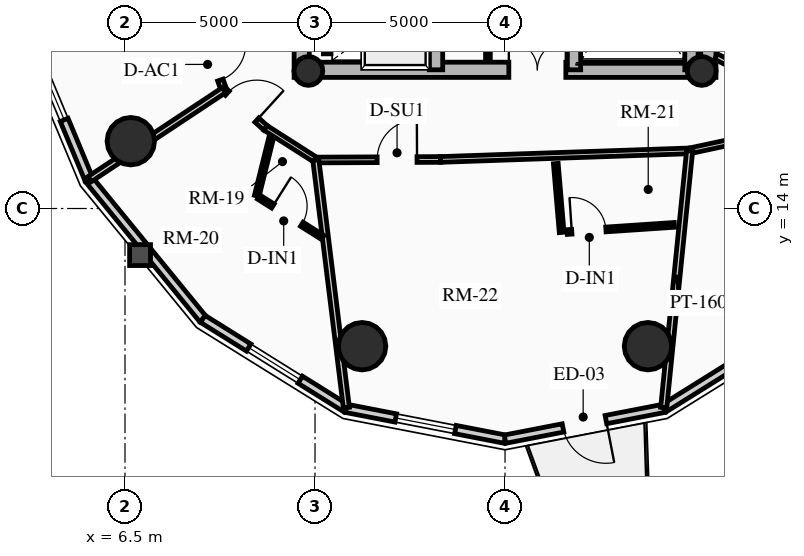
"""IFC4 building model, lengths in metres.
Left out: names, types, materials, properties, quantities, classifications, styles, units other than length and angle.
Written with IfcOpenShell. Run it as: python <this file> out.ifc"""

import sys

from ifc_helpers import new_model, si_unit, direction, frame, frame_2d, origin, origin_2d, place, context, subcontext, project, spatial, rectangle, circle, hollow_circle, extrude, source, transform, mapped, element, fill, save


model = new_model("IFC4")
c1 = context("Model", 3, precision=1e-05, world=origin(), true_north=direction((0.0, 1.0)))
c2 = subcontext(c1, "Body", "Model", "MODEL_VIEW")
j1 = project(units=[si_unit("LENGTHUNIT", "METRE"), si_unit("PLANEANGLEUNIT", "RADIAN")], contexts=[c1])
p1 = place(None, origin())
s1 = spatial("IfcSite", under=j1, at=p1, CompositionType="ELEMENT")
p2 = place(p1, origin())
s2 = spatial("IfcBuilding", under=s1, at=p2, CompositionType="ELEMENT")
p3 = place(p2, frame((0.0, 0.0, 180.7)))
s3 = spatial("IfcBuildingStorey", under=s2, at=p3, CompositionType="ELEMENT", Elevation=180.7)
for number, where, z_axis, x_axis in (
    (1, (11.15, 17.45, 0.0), (0.0, 0.0, 1.0), (0.0, 1.0, 0.0)),
    (2, (21.85, 17.45, 0.0), (0.0, 0.0, 1.0), (0.0, 1.0, 0.0)),
):
    element("IfcWall", number, at=place(p3, frame(where, z_axis=z_axis, x_axis=x_axis)), inside=s3, PredefinedType="SHEAR", context=c2, shape_type="SweptSolid", body=[
        extrude(rectangle(XDim=14.1, YDim=0.4, at=frame_2d((7.05, 0.0))), origin(), (0.0, 0.0, 1.0), 2.91),
    ])
p4 = place(p3, frame((11.15, 17.65, 0.0), z_axis=(0.0, 0.0, 1.0), x_axis=(1.0, 0.0, 0.0)))
e3 = element("IfcWall", 3, at=p4, inside=s3, PredefinedType="SHEAR", context=c2, shape_type="SweptSolid", body=[
    extrude(rectangle(XDim=10.7, YDim=0.4, at=frame_2d((5.35, 0.0))), origin(), (0.0, 0.0, 1.0), 2.91),
])
m1 = source(origin(), c2, "Body", "SweptSolid", [
    extrude(rectangle(XDim=1.5, YDim=2.02, at=frame_2d((0.75, 1.01))), frame((0.0, 0.21, 0.0), z_axis=(0.0, -1.0, 0.0), x_axis=(1.0, 0.0, 0.0)), (0.0, 0.0, 1.0), 0.42),
])
p5 = place(p4, frame((5.45, 0.0, 0.0)))
e4 = element("IfcOpeningElement", 4, at=p5, cuts=e3, PredefinedType="OPENING", context=c2, shape_type="MappedRepresentation", body=[
    mapped(m1, transform((0.0, 0.0, 0.0), x_axis=(1.0, 0.0, 0.0), y_axis=(0.0, 1.0, 0.0), z_axis=(0.0, 0.0, 1.0), scale=1.0)),
])
p6 = place(p3, frame((14.685, 17.65, 0.0), z_axis=(0.0, 0.0, 1.0), x_axis=(0.0, 1.0, 0.0)))
e5 = element("IfcWall", 5, at=p6, inside=s3, PredefinedType="SHEAR", context=c2, shape_type="SweptSolid", body=[
    extrude(rectangle(XDim=13.7, YDim=0.35, at=frame_2d((6.85, 0.0))), origin(), (0.0, 0.0, 1.0), 2.91),
])
m2 = source(origin(), c2, "Body", "SweptSolid", [
    extrude(rectangle(XDim=1.1, YDim=2.015, at=frame_2d((0.55, 1.007))), frame((0.0, 0.185, 0.0), z_axis=(0.0, -1.0, 0.0), x_axis=(1.0, 0.0, 0.0)), (0.0, 0.0, 1.0), 0.37),
])
p7 = place(p6, frame((4.85, 0.0, 0.0)))
e6 = element("IfcOpeningElement", 6, at=p7, cuts=e5, PredefinedType="OPENING", context=c2, shape_type="MappedRepresentation", body=[
    mapped(m2, transform((0.0, 0.0, 0.0), x_axis=(1.0, 0.0, 0.0), y_axis=(0.0, 1.0, 0.0), z_axis=(0.0, 0.0, 1.0), scale=1.0)),
])
p8 = place(p6, frame((0.625, 0.0, 0.0)))
e7 = element("IfcOpeningElement", 7, at=p8, cuts=e5, PredefinedType="OPENING", context=c2, shape_type="MappedRepresentation", body=[
    mapped(m2, transform((0.0, 0.0, 0.0), x_axis=(1.0, 0.0, 0.0), y_axis=(0.0, 1.0, 0.0), z_axis=(0.0, 0.0, 1.0), scale=1.0)),
])
p9 = place(p6, frame((2.625, 0.0, 0.0)))
e8 = element("IfcOpeningElement", 8, at=p9, cuts=e5, PredefinedType="OPENING", context=c2, shape_type="MappedRepresentation", body=[
    mapped(m2, transform((0.0, 0.0, 0.0), x_axis=(1.0, 0.0, 0.0), y_axis=(0.0, 1.0, 0.0), z_axis=(0.0, 0.0, 1.0), scale=1.0)),
])
m3 = source(origin(), c2, "Body", "SweptSolid", [
    extrude(rectangle(XDim=1.15, YDim=2.02, at=frame_2d((0.575, 1.01))), frame((0.0, 0.185, 0.0), z_axis=(0.0, -1.0, 0.0), x_axis=(1.0, 0.0, 0.0)), (0.0, 0.0, 1.0), 0.37),
])
p10 = place(p6, frame((7.27, 0.0, 0.0)))
e9 = element("IfcOpeningElement", 9, at=p10, cuts=e5, PredefinedType="OPENING", context=c2, shape_type="MappedRepresentation", body=[
    mapped(m3, transform((0.0, 0.0, 0.0), x_axis=(1.0, 0.0, 0.0), y_axis=(0.0, 1.0, 0.0), z_axis=(0.0, 0.0, 1.0), scale=1.0)),
])
p11 = place(p3, frame((18.315, 17.65, 0.0), z_axis=(0.0, 0.0, 1.0), x_axis=(0.0, 1.0, 0.0)))
e10 = element("IfcWall", 10, at=p11, inside=s3, PredefinedType="SHEAR", context=c2, shape_type="SweptSolid", body=[
    extrude(rectangle(XDim=9.6, YDim=0.35, at=frame_2d((4.8, 0.0))), origin(), (0.0, 0.0, 1.0), 2.91),
])
p12 = place(p11, frame((5.28, 0.0, 0.0)))
e11 = element("IfcOpeningElement", 11, at=p12, cuts=e10, PredefinedType="OPENING", context=c2, shape_type="MappedRepresentation", body=[
    mapped(m3, transform((0.0, 0.0, 0.0), x_axis=(1.0, 0.0, 0.0), y_axis=(0.0, 1.0, 0.0), z_axis=(0.0, 0.0, 1.0), scale=1.0)),
])
p13 = place(p3, frame((21.405, 17.65, 0.0), z_axis=(0.0, 0.0, 1.0), x_axis=(0.0, 1.0, 0.0)))
e12 = element("IfcWall", 12, at=p13, inside=s3, PredefinedType="SHEAR", context=c2, shape_type="SweptSolid", body=[
    extrude(rectangle(XDim=6.695, YDim=0.35, at=frame_2d((3.348, 0.0))), origin(), (0.0, 0.0, 1.0), 2.91),
])
for number, where, z_axis, x_axis in (
    (13, (11.325, 17.62, 0.0), (0.0, 0.0, 1.0), (1.0, 0.0, 0.0)),
    (14, (21.675, 17.62, 0.0), (0.0, 0.0, 1.0), (1.0, 0.0, 0.0)),
):
    element("IfcColumn", number, at=place(p3, frame(where, z_axis=z_axis, x_axis=x_axis)), inside=s3, PredefinedType="COLUMN", context=c2, shape_type="SweptSolid", body=[
        extrude(hollow_circle(Radius=0.38, WallThickness=0.032, at=origin_2d()), origin(), (0.0, 0.0, 1.0), 2.91),
    ])
for number, where, z_axis, x_axis in (
    (15, (6.653, 15.771, 0.0), (0.0, 0.0, 1.0), (1.0, 0.0, 0.0)),
    (16, (12.739, 10.377, 0.0), (0.0, 0.0, 1.0), (1.0, 0.0, 0.0)),
    (17, (20.261, 10.377, 0.0), (0.0, 0.0, 1.0), (1.0, 0.0, 0.0)),
):
    element("IfcColumn", number, at=place(p3, frame(where, z_axis=z_axis, x_axis=x_axis)), inside=s3, PredefinedType="USERDEFINED", context=c2, shape_type="SweptSolid", body=[
        extrude(circle(Radius=0.625, at=origin_2d()), origin(), (0.0, 0.0, 1.0), 2.91),
    ])
p14 = place(p3, frame((5.553, 14.76, 0.0), z_axis=(0.0, 0.0, 1.0), x_axis=(-0.384144094086, 0.923273152961, 0.0)))
e18 = element("IfcWall", 18, at=p14, inside=s3, PredefinedType="SOLIDWALL", context=c2, shape_type="SweptSolid", body=[
    extrude(rectangle(XDim=5.003, YDim=0.22, at=frame_2d((2.501, 0.0))), origin(), (0.0, 0.0, 1.0), 2.245),
])
m4 = source(origin(), c2, "Body", "SweptSolid", [
    extrude(rectangle(XDim=1.6, YDim=1.3, at=frame_2d((0.8, 0.65))), frame((0.0, 0.12, 0.0), z_axis=(0.0, -1.0, 0.0), x_axis=(1.0, 0.0, 0.0)), (0.0, 0.0, 1.0), 0.24),
])
p15 = place(p14, frame((1.702, 0.0, 0.65)))
e19 = element("IfcOpeningElement", 19, at=p15, cuts=e18, PredefinedType="OPENING", context=c2, shape_type="MappedRepresentation", body=[
    mapped(m4, transform((0.0, 0.0, 0.0), x_axis=(1.0, 0.0, 0.0), y_axis=(0.0, 1.0, 0.0), z_axis=(0.0, 0.0, 1.0), scale=1.0)),
])
p16 = place(p3, frame((8.547, 11.094, 0.0), z_axis=(0.0, 0.0, 1.0), x_axis=(-0.632470615287, 0.774584353572, 0.0)))
e20 = element("IfcWall", 20, at=p16, inside=s3, PredefinedType="SOLIDWALL", context=c2, shape_type="SweptSolid", body=[
    extrude(rectangle(XDim=4.733, YDim=0.22, at=frame_2d((2.366, 0.0))), origin(), (0.0, 0.0, 1.0), 2.245),
])
p17 = place(p3, frame((12.319, 8.741, 0.0), z_axis=(0.0, 0.0, 1.0), x_axis=(-0.848399108042, 0.529357113368, 0.0)))
e21 = element("IfcWall", 21, at=p17, inside=s3, PredefinedType="SOLIDWALL", context=c2, shape_type="SweptSolid", body=[
    extrude(rectangle(XDim=4.446, YDim=0.22, at=frame_2d((2.223, 0.0))), origin(), (0.0, 0.0, 1.0), 2.245),
])
p18 = place(p17, frame((1.423, 0.0, 0.65)))
e22 = element("IfcOpeningElement", 22, at=p18, cuts=e21, PredefinedType="OPENING", context=c2, shape_type="MappedRepresentation", body=[
    mapped(m4, transform((0.0, 0.0, 0.0), x_axis=(1.0, 0.0, 0.0), y_axis=(0.0, 1.0, 0.0), z_axis=(0.0, 0.0, 1.0), scale=1.0)),
])
p19 = place(p3, frame((16.5, 7.93, 0.0), z_axis=(0.0, 0.0, 1.0), x_axis=(-0.981703883443, 0.190413983815, 0.0)))
e23 = element("IfcWall", 23, at=p19, inside=s3, PredefinedType="SOLIDWALL", context=c2, shape_type="SweptSolid", body=[
    extrude(rectangle(XDim=4.259, YDim=0.22, at=frame_2d((2.13, 0.0))), origin(), (0.0, 0.0, 1.0), 2.245),
])
p20 = place(p19, frame((1.33, 0.0, 0.65)))
e24 = element("IfcOpeningElement", 24, at=p20, cuts=e23, PredefinedType="OPENING", context=c2, shape_type="MappedRepresentation", body=[
    mapped(m4, transform((0.0, 0.0, 0.0), x_axis=(1.0, 0.0, 0.0), y_axis=(0.0, 1.0, 0.0), z_axis=(0.0, 0.0, 1.0), scale=1.0)),
])
p21 = place(p3, frame((20.681, 8.741, 0.0), z_axis=(0.0, 0.0, 1.0), x_axis=(-0.981703883443, -0.190413983815, 0.0)))
e25 = element("IfcWall", 25, at=p21, inside=s3, PredefinedType="SOLIDWALL", context=c2, shape_type="SweptSolid", body=[
    extrude(rectangle(XDim=4.259, YDim=0.22, at=frame_2d((2.13, 0.0))), origin(), (0.0, 0.0, 1.0), 2.245),
])
m5 = source(origin(), c2, "Body", "SweptSolid", [
    extrude(rectangle(XDim=1.15, YDim=2.005, at=frame_2d((0.575, 1.002))), frame((0.0, 0.12, 0.0), z_axis=(0.0, -1.0, 0.0), x_axis=(1.0, 0.0, 0.0)), (0.0, 0.0, 1.0), 0.24),
])
p22 = place(p21, frame((1.555, 0.0, 0.0)))
e26 = element("IfcOpeningElement", 26, at=p22, cuts=e25, PredefinedType="OPENING", context=c2, shape_type="MappedRepresentation", body=[
    mapped(m5, transform((0.0, 0.0, 0.0), x_axis=(1.0, 0.0, 0.0), y_axis=(0.0, 1.0, 0.0), z_axis=(0.0, 0.0, 1.0), scale=1.0)),
])
p23 = place(p3, frame((24.453, 11.094, 0.0), z_axis=(0.0, 0.0, 1.0), x_axis=(-0.848399108042, -0.529357113368, 0.0)))
e27 = element("IfcWall", 27, at=p23, inside=s3, PredefinedType="SOLIDWALL", context=c2, shape_type="SweptSolid", body=[
    extrude(rectangle(XDim=4.446, YDim=0.22, at=frame_2d((2.223, 0.0))), origin(), (0.0, 0.0, 1.0), 2.245),
])
p24 = place(p3, frame((11.82, 18.07, 0.0), z_axis=(0.0, 0.0, 1.0), x_axis=(0.0, 1.0, 0.0)))
e28 = element("IfcWall", 28, at=p24, inside=s3, PredefinedType="SHEAR", context=c2, shape_type="SweptSolid", body=[
    extrude(rectangle(XDim=1.635, YDim=0.2, at=frame_2d((0.817, 0.0))), origin(), (0.0, 0.0, 1.0), 2.91),
])
p25 = place(p3, frame((16.05, 17.92, 0.0), z_axis=(0.0, 0.0, 1.0), x_axis=(0.0, 1.0, 0.0)))
e29 = element("IfcWall", 29, at=p25, inside=s3, PredefinedType="PARTITIONING", context=c2, shape_type="SweptSolid", body=[
    extrude(rectangle(XDim=3.08, YDim=0.125, at=frame_2d((1.54, 0.0))), origin(), (0.0, 0.0, 1.0), 2.675),
])
m6 = source(origin(), c2, "Body", "SweptSolid", [
    extrude(rectangle(XDim=0.9, YDim=2.005, at=frame_2d((0.45, 1.002))), frame((0.0, 0.073, 0.0), z_axis=(0.0, -1.0, 0.0), x_axis=(1.0, 0.0, 0.0)), (0.0, 0.0, 1.0), 0.145),
])
p26 = place(p25, frame((1.05, 0.0, 0.0)))
e30 = element("IfcOpeningElement", 30, at=p26, cuts=e29, PredefinedType="OPENING", context=c2, shape_type="MappedRepresentation", body=[
    mapped(m6, transform((0.0, 0.0, 0.0), x_axis=(1.0, 0.0, 0.0), y_axis=(0.0, 1.0, 0.0), z_axis=(0.0, 0.0, 1.0), scale=1.0)),
])
p27 = place(p3, frame((8.636, 18.436, 0.0), z_axis=(0.0, 0.0, 1.0), x_axis=(0.333211866524, -0.942851977782, 0.0)))
e31 = element("IfcWall", 31, at=p27, inside=s3, PredefinedType="PARTITIONING", context=c2, shape_type="SweptSolid", body=[
    extrude(rectangle(XDim=1.402, YDim=0.15, at=frame_2d((0.701, 0.0))), origin(), (0.0, 0.0, 1.0), 2.245),
])
m7 = source(origin(), c2, "Body", "SweptSolid", [
    extrude(rectangle(XDim=1.0, YDim=2.015, at=frame_2d((0.5, 1.007))), frame((0.0, 0.085, 0.0), z_axis=(0.0, -1.0, 0.0), x_axis=(1.0, 0.0, 0.0)), (0.0, 0.0, 1.0), 0.17),
])
p28 = place(p27, frame((0.12, 0.0, 0.0)))
e32 = element("IfcOpeningElement", 32, at=p28, cuts=e31, PredefinedType="OPENING", context=c2, shape_type="MappedRepresentation", body=[
    mapped(m7, transform((0.0, 0.0, 0.0), x_axis=(1.0, 0.0, 0.0), y_axis=(0.0, 1.0, 0.0), z_axis=(0.0, 0.0, 1.0), scale=1.0)),
])
p29 = place(p3, frame((9.103, 17.115, 0.0), z_axis=(0.0, 0.0, 1.0), x_axis=(0.740186897911, -0.672401186912, 0.0)))
e33 = element("IfcWall", 33, at=p29, inside=s3, PredefinedType="PARTITIONING", context=c2, shape_type="SweptSolid", body=[
    extrude(rectangle(XDim=1.477, YDim=0.15, at=frame_2d((0.738, 0.0))), origin(), (0.0, 0.0, 1.0), 2.245),
])
m8 = source(origin(), c2, "Body", "SweptSolid", [
    extrude(rectangle(XDim=1.05, YDim=2.015, at=frame_2d((0.525, 1.007))), frame((0.0, 0.085, 0.0), z_axis=(0.0, -1.0, 0.0), x_axis=(1.0, 0.0, 0.0)), (0.0, 0.0, 1.0), 0.17),
])
p30 = place(p29, frame((0.12, 0.0, 0.0)))
e34 = element("IfcOpeningElement", 34, at=p30, cuts=e33, PredefinedType="OPENING", context=c2, shape_type="MappedRepresentation", body=[
    mapped(m8, transform((0.0, 0.0, 0.0), x_axis=(1.0, 0.0, 0.0), y_axis=(0.0, 1.0, 0.0), z_axis=(0.0, 0.0, 1.0), scale=1.0)),
])
p31 = place(p3, frame((10.196, 16.122, 0.0), z_axis=(0.0, 0.0, 1.0), x_axis=(0.843021142441, -0.537880426673, 0.0)))
e35 = element("IfcWall", 35, at=p31, inside=s3, PredefinedType="PARTITIONING", context=c2, shape_type="SweptSolid", body=[
    extrude(rectangle(XDim=1.571, YDim=0.15, at=frame_2d((0.786, 0.0))), origin(), (0.0, 0.0, 1.0), 2.245),
])
p32 = place(p3, frame((11.521, 15.276, 0.0), z_axis=(0.0, 0.0, 1.0), x_axis=(0.999990688463, 0.004315436007, 0.0)))
e36 = element("IfcWall", 36, at=p32, inside=s3, PredefinedType="PARTITIONING", context=c2, shape_type="SweptSolid", body=[
    extrude(rectangle(XDim=3.281, YDim=0.15, at=frame_2d((1.641, 0.0))), origin(), (0.0, 0.0, 1.0), 2.245),
])
p33 = place(p32, frame((1.613, 0.0, 0.0)))
e37 = element("IfcOpeningElement", 37, at=p33, cuts=e36, PredefinedType="OPENING", context=c2, shape_type="MappedRepresentation", body=[
    mapped(m8, transform((0.0, 0.0, 0.0), x_axis=(1.0, 0.0, 0.0), y_axis=(0.0, 1.0, 0.0), z_axis=(0.0, 0.0, 1.0), scale=1.0)),
])
p34 = place(p3, frame((14.802, 15.291, 0.0), z_axis=(0.0, 0.0, 1.0), x_axis=(0.999405778293, 0.034468686011, 0.0)))
e38 = element("IfcWall", 38, at=p34, inside=s3, PredefinedType="PARTITIONING", context=c2, shape_type="SweptSolid", body=[
    extrude(rectangle(XDim=6.559, YDim=0.15, at=frame_2d((3.279, 0.0))), origin(), (0.0, 0.0, 1.0), 2.245),
])
p35 = place(p3, frame((21.357, 15.517, 0.0), z_axis=(0.0, 0.0, 1.0), x_axis=(0.977773676035, 0.209663154733, 0.0)))
e39 = element("IfcWall", 39, at=p35, inside=s3, PredefinedType="PARTITIONING", context=c2, shape_type="SweptSolid", body=[
    extrude(rectangle(XDim=1.865, YDim=0.15, at=frame_2d((0.933, 0.0))), origin(), (0.0, 0.0, 1.0), 2.245),
])
p36 = place(p3, frame((9.103, 17.115, 0.0), z_axis=(0.0, 0.0, 1.0), x_axis=(-0.833535637115, -0.552465692745, 0.0)))
e40 = element("IfcWall", 40, at=p36, inside=s3, PredefinedType="PARTITIONING", context=c2, shape_type="SweptSolid", body=[
    extrude(rectangle(XDim=4.24, YDim=0.16, at=frame_2d((2.12, 0.0))), origin(), (0.0, 0.0, 1.0), 2.245),
])
p37 = place(p3, frame((11.521, 15.276, 0.0), z_axis=(0.0, 0.0, 1.0), x_axis=(0.122446537769, -0.992475110715, 0.0)))
e41 = element("IfcWall", 41, at=p37, inside=s3, PredefinedType="PARTITIONING", context=c2, shape_type="SweptSolid", body=[
    extrude(rectangle(XDim=6.566, YDim=0.16, at=frame_2d((3.283, 0.0))), origin(), (0.0, 0.0, 1.0), 2.245),
])
p38 = place(p3, frame((21.357, 15.517, 0.0), z_axis=(0.0, 0.0, 1.0), x_axis=(-0.100446941693, -0.994942416376, 0.0)))
e42 = element("IfcWall", 42, at=p38, inside=s3, PredefinedType="PARTITIONING", context=c2, shape_type="SweptSolid", body=[
    extrude(rectangle(XDim=6.791, YDim=0.16, at=frame_2d((3.396, 0.0))), origin(), (0.0, 0.0, 1.0), 2.245),
])
p39 = place(p3, frame((22.05, 18.0, 0.0), z_axis=(0.0, 0.0, 1.0), x_axis=(0.890660222535, -0.454669515136, 0.0)))
e43 = element("IfcWall", 43, at=p39, inside=s3, PredefinedType="PARTITIONING", context=c2, shape_type="SweptSolid", body=[
    extrude(rectangle(XDim=2.144, YDim=0.16, at=frame_2d((1.072, 0.0))), origin(), (0.0, 0.0, 1.0), 2.245),
])
m9 = source(origin(), c2, "Body", "SweptSolid", [
    extrude(rectangle(XDim=1.05, YDim=2.015, at=frame_2d((0.525, 1.007))), frame((0.0, 0.09, 0.0), z_axis=(0.0, -1.0, 0.0), x_axis=(1.0, 0.0, 0.0)), (0.0, 0.0, 1.0), 0.18),
])
p40 = place(p39, frame((0.894, 0.0, 0.0)))
e44 = element("IfcOpeningElement", 44, at=p40, cuts=e43, PredefinedType="OPENING", context=c2, shape_type="MappedRepresentation", body=[
    mapped(m9, transform((0.0, 0.0, 0.0), x_axis=(1.0, 0.0, 0.0), y_axis=(0.0, 1.0, 0.0), z_axis=(0.0, 0.0, 1.0), scale=1.0)),
])
p41 = place(p3, frame((10.343, 15.847, 0.0), z_axis=(0.0, 0.0, 1.0), x_axis=(-0.240988864291, -0.970527880737, 0.0)))
e45 = element("IfcWall", 45, at=p41, inside=s3, PredefinedType="PARTITIONING", context=c2, shape_type="SweptSolid", body=[
    extrude(rectangle(XDim=1.56, YDim=0.125, at=frame_2d((0.78, 0.0))), origin(), (0.0, 0.0, 1.0), 2.245),
])
p42 = place(p3, frame((10.02, 14.299, 0.0), z_axis=(0.0, 0.0, 1.0), x_axis=(0.846015763056, -0.533157883427, 0.0)))
e46 = element("IfcWall", 46, at=p42, inside=s3, PredefinedType="PARTITIONING", context=c2, shape_type="SweptSolid", body=[
    extrude(rectangle(XDim=1.991, YDim=0.125, at=frame_2d((0.996, 0.0))), origin(), (0.0, 0.0, 1.0), 2.675),
])
p43 = place(p42, frame((0.439, 0.0, 0.0)))
e47 = element("IfcOpeningElement", 47, at=p43, cuts=e46, PredefinedType="OPENING", context=c2, shape_type="MappedRepresentation", body=[
    mapped(m6, transform((0.0, 0.0, 0.0), x_axis=(1.0, 0.0, 0.0), y_axis=(0.0, 1.0, 0.0), z_axis=(0.0, 0.0, 1.0), scale=1.0)),
])
p44 = place(p3, frame((17.836, 15.182, 0.0), z_axis=(0.0, 0.0, 1.0), x_axis=(0.084856554172, -0.996393178025, 0.0)))
e48 = element("IfcWall", 48, at=p44, inside=s3, PredefinedType="PARTITIONING", context=c2, shape_type="SweptSolid", body=[
    extrude(rectangle(XDim=1.818, YDim=0.125, at=frame_2d((0.909, 0.0))), origin(), (0.0, 0.0, 1.0), 2.675),
])
p45 = place(p3, frame((18.137, 13.38, 0.0), z_axis=(0.0, 0.0, 1.0), x_axis=(0.997767152953, 0.066788535611, 0.0)))
e49 = element("IfcWall", 49, at=p45, inside=s3, PredefinedType="PARTITIONING", context=c2, shape_type="SweptSolid", body=[
    extrude(rectangle(XDim=2.826, YDim=0.125, at=frame_2d((1.413, 0.0))), origin(), (0.0, 0.0, 1.0), 2.245),
])
p46 = place(p45, frame((0.12, 0.0, 0.0)))
e50 = element("IfcOpeningElement", 50, at=p46, cuts=e49, PredefinedType="OPENING", context=c2, shape_type="MappedRepresentation", body=[
    mapped(m6, transform((0.0, 0.0, 0.0), x_axis=(1.0, 0.0, 0.0), y_axis=(0.0, 1.0, 0.0), z_axis=(0.0, 0.0, 1.0), scale=1.0)),
])
m10 = source(origin(), c2, "Body", "SweptSolid", [
    extrude(rectangle(XDim=1.6, YDim=1.3, at=frame_2d((0.8, 0.65))), frame((0.0, 0.03, 0.0), z_axis=(0.0, -1.0, 0.0), x_axis=(1.0, 0.0, 0.0)), (0.0, 0.0, 1.0), 0.06),
])
p47 = place(p15, origin())
e51 = element("IfcWindow", 51, at=p47, inside=s3, PartitioningType="SINGLE_PANEL", PredefinedType="WINDOW", context=c2, shape_type="MappedRepresentation", body=[
    mapped(m10, transform((0.0, 0.0, 0.0), x_axis=(1.0, 0.0, 0.0), y_axis=(0.0, 1.0, 0.0), z_axis=(0.0, 0.0, 1.0), scale=1.0)),
])
fill(e19, e51)
p48 = place(p18, origin())
e52 = element("IfcWindow", 52, at=p48, inside=s3, PartitioningType="SINGLE_PANEL", PredefinedType="WINDOW", context=c2, shape_type="MappedRepresentation", body=[
    mapped(m10, transform((0.0, 0.0, 0.0), x_axis=(1.0, 0.0, 0.0), y_axis=(0.0, 1.0, 0.0), z_axis=(0.0, 0.0, 1.0), scale=1.0)),
])
fill(e22, e52)
p49 = place(p20, origin())
e53 = element("IfcWindow", 53, at=p49, inside=s3, PartitioningType="SINGLE_PANEL", PredefinedType="WINDOW", context=c2, shape_type="MappedRepresentation", body=[
    mapped(m10, transform((0.0, 0.0, 0.0), x_axis=(1.0, 0.0, 0.0), y_axis=(0.0, 1.0, 0.0), z_axis=(0.0, 0.0, 1.0), scale=1.0)),
])
fill(e24, e53)
m11 = source(origin(), c2, "Body", "SweptSolid", [
    extrude(rectangle(XDim=1.15, YDim=2.005, at=frame_2d((0.575, 1.002))), frame((0.0, 0.025, 0.0), z_axis=(0.0, -1.0, 0.0), x_axis=(1.0, 0.0, 0.0)), (0.0, 0.0, 1.0), 0.05),
])
p50 = place(p22, origin())
e54 = element("IfcDoor", 54, at=p50, inside=s3, OperationType="SINGLE_SWING_LEFT", PredefinedType="DOOR", context=c2, shape_type="MappedRepresentation", body=[
    mapped(m11, transform((0.0, 0.0, 0.0), x_axis=(1.0, 0.0, 0.0), y_axis=(0.0, 1.0, 0.0), z_axis=(0.0, 0.0, 1.0), scale=1.0)),
])
fill(e26, e54)
m12 = source(origin(), c2, "Body", "SweptSolid", [
    extrude(rectangle(XDim=1.5, YDim=2.02, at=frame_2d((0.75, 1.01))), frame((0.0, 0.025, 0.0), z_axis=(0.0, -1.0, 0.0), x_axis=(1.0, 0.0, 0.0)), (0.0, 0.0, 1.0), 0.05),
])
p51 = place(p5, origin())
e55 = element("IfcDoor", 55, at=p51, inside=s3, OperationType="DOUBLE_DOOR_SINGLE_SWING", PredefinedType="DOOR", context=c2, shape_type="MappedRepresentation", body=[
    mapped(m12, transform((0.0, 0.0, 0.0), x_axis=(1.0, 0.0, 0.0), y_axis=(0.0, 1.0, 0.0), z_axis=(0.0, 0.0, 1.0), scale=1.0)),
])
fill(e4, e55)
m13 = source(origin(), c2, "Body", "SweptSolid", [
    extrude(rectangle(XDim=1.0, YDim=2.015, at=frame_2d((0.5, 1.007))), frame((0.0, 0.025, 0.0), z_axis=(0.0, -1.0, 0.0), x_axis=(1.0, 0.0, 0.0)), (0.0, 0.0, 1.0), 0.05),
])
p52 = place(p28, origin())
e56 = element("IfcDoor", 56, at=p52, inside=s3, OperationType="SINGLE_SWING_LEFT", PredefinedType="DOOR", context=c2, shape_type="MappedRepresentation", body=[
    mapped(m13, transform((0.0, 0.0, 0.0), x_axis=(1.0, 0.0, 0.0), y_axis=(0.0, 1.0, 0.0), z_axis=(0.0, 0.0, 1.0), scale=1.0)),
])
fill(e32, e56)
m14 = source(origin(), c2, "Body", "SweptSolid", [
    extrude(rectangle(XDim=1.05, YDim=2.015, at=frame_2d((0.525, 1.007))), frame((0.0, 0.025, 0.0), z_axis=(0.0, -1.0, 0.0), x_axis=(1.0, 0.0, 0.0)), (0.0, 0.0, 1.0), 0.05),
])
p53 = place(p30, origin())
e57 = element("IfcDoor", 57, at=p53, inside=s3, OperationType="SINGLE_SWING_RIGHT", PredefinedType="DOOR", context=c2, shape_type="MappedRepresentation", body=[
    mapped(m14, transform((0.0, 0.0, 0.0), x_axis=(1.0, 0.0, 0.0), y_axis=(0.0, 1.0, 0.0), z_axis=(0.0, 0.0, 1.0), scale=1.0)),
])
fill(e34, e57)
m15 = source(origin(), c2, "Body", "SweptSolid", [
    extrude(rectangle(XDim=0.9, YDim=2.005, at=frame_2d((0.45, 1.002))), frame((0.0, 0.025, 0.0), z_axis=(0.0, -1.0, 0.0), x_axis=(1.0, 0.0, 0.0)), (0.0, 0.0, 1.0), 0.05),
])
p54 = place(p43, origin())
e58 = element("IfcDoor", 58, at=p54, inside=s3, OperationType="SINGLE_SWING_LEFT", PredefinedType="DOOR", context=c2, shape_type="MappedRepresentation", body=[
    mapped(m15, transform((0.0, 0.0, 0.0), x_axis=(1.0, 0.0, 0.0), y_axis=(0.0, 1.0, 0.0), z_axis=(0.0, 0.0, 1.0), scale=1.0)),
])
fill(e47, e58)
p55 = place(p33, origin())
e59 = element("IfcDoor", 59, at=p55, inside=s3, OperationType="SINGLE_SWING_RIGHT", PredefinedType="DOOR", context=c2, shape_type="MappedRepresentation", body=[
    mapped(m14, transform((0.0, 0.0, 0.0), x_axis=(1.0, 0.0, 0.0), y_axis=(0.0, 1.0, 0.0), z_axis=(0.0, 0.0, 1.0), scale=1.0)),
])
fill(e37, e59)
p56 = place(p46, origin())
e60 = element("IfcDoor", 60, at=p56, inside=s3, OperationType="SINGLE_SWING_LEFT", PredefinedType="DOOR", context=c2, shape_type="MappedRepresentation", body=[
    mapped(m15, transform((0.0, 0.0, 0.0), x_axis=(1.0, 0.0, 0.0), y_axis=(0.0, 1.0, 0.0), z_axis=(0.0, 0.0, 1.0), scale=1.0)),
])
fill(e50, e60)
save(model, sys.argv[1])
